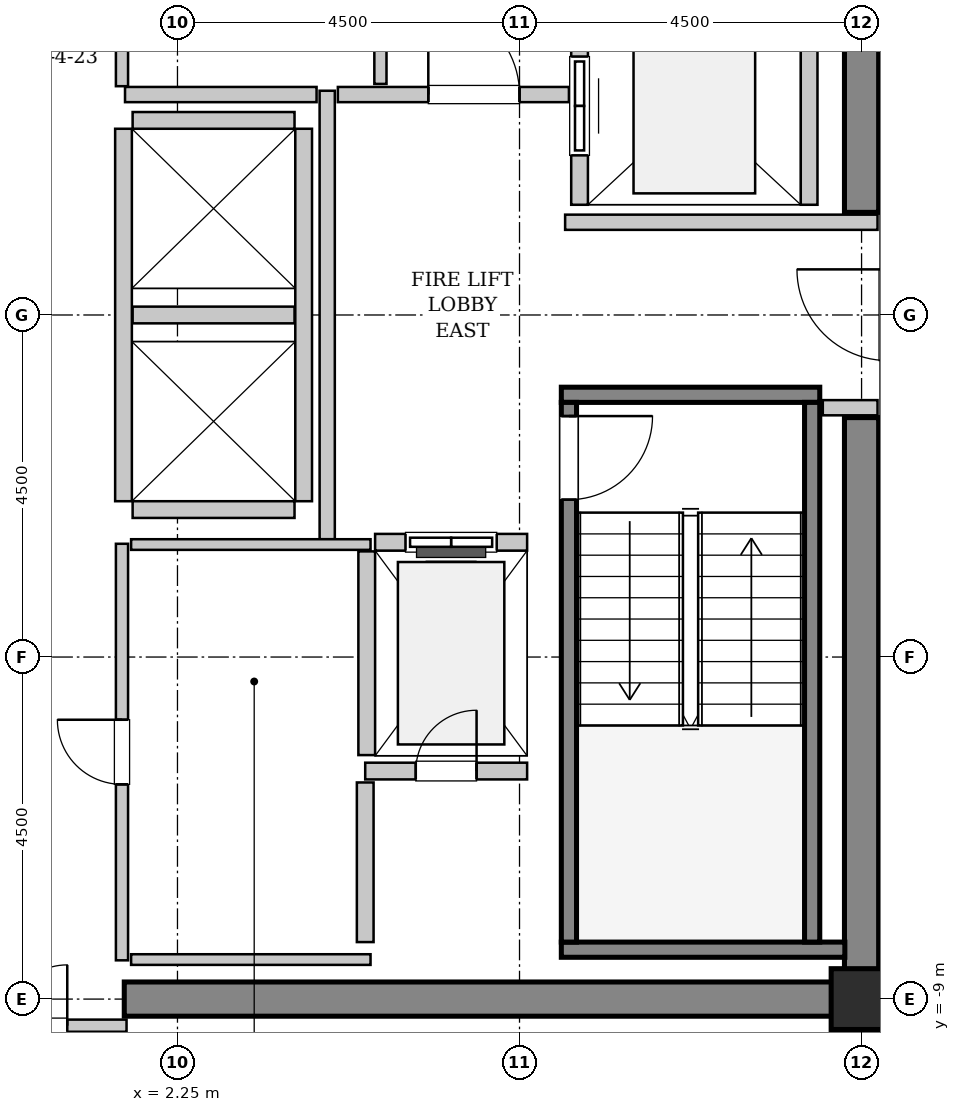
"""IFC4 building model, lengths in metres.
Left out: names, types, materials, properties, quantities, classifications, styles, units other than length and angle.
Written with IfcOpenShell. Run it as: python <this file> out.ifc"""

import sys

from ifc_helpers import new_model, si_unit, direction, frame, frame_2d, origin, origin_2d, place, context, subcontext, project, spatial, rectangle, hollow_rectangle, extrude, source, transform, mapped, element, fill, save


model = new_model("IFC4")
c1 = context("Model", 3, precision=1e-05, world=origin(), true_north=direction((0.0, 1.0)))
c2 = subcontext(c1, "Body", "Model", "MODEL_VIEW")
j1 = project(units=[si_unit("LENGTHUNIT", "METRE"), si_unit("PLANEANGLEUNIT", "RADIAN")], contexts=[c1])
p1 = place(None, origin())
s1 = spatial("IfcSite", under=j1, at=p1, CompositionType="ELEMENT")
p2 = place(p1, origin())
s2 = spatial("IfcBuilding", under=s1, at=p2, CompositionType="ELEMENT")
p3 = place(p2, frame((0.0, 0.0, 287.4)))
s3 = spatial("IfcBuildingStorey", under=s2, at=p3, CompositionType="ELEMENT", Elevation=287.4)
m1 = source(origin(), c2, "Body", "SweptSolid", [
    extrude(rectangle(XDim=9.925, YDim=0.45, at=frame_2d((4.962, 0.0))), origin(), (0.0, 0.0, 1.0), 3.8),
])
p4 = place(p3, frame((1.55, -9.0, 0.0), z_axis=(0.0, 0.0, 1.0), x_axis=(1.0, 0.0, 0.0)))
e1 = element("IfcWall", 1, at=p4, inside=s3, PredefinedType="SHEAR", context=c2, shape_type="MappedRepresentation", body=[
    mapped(m1, transform((0.0, 0.0, 0.0), x_axis=(1.0, 0.0, 0.0), y_axis=(0.0, 1.0, 0.0), z_axis=(0.0, 0.0, 1.0), scale=1.0)),
])
m2 = source(origin(), c2, "Body", "SweptSolid", [
    extrude(rectangle(XDim=7.425, YDim=0.45, at=frame_2d((3.712, 0.0))), origin(), (0.0, 0.0, 1.0), 3.8),
])
for number, where, z_axis, x_axis in (
    (2, (11.25, -8.775, 0.0), (0.0, 0.0, 1.0), (0.0, 1.0, 0.0)),
    (3, (11.25, 1.35, 0.0), (0.0, 0.0, 1.0), (0.0, 1.0, 0.0)),
):
    element("IfcWall", number, at=place(p3, frame(where, z_axis=z_axis, x_axis=x_axis)), inside=s3, PredefinedType="SHEAR", context=c2, shape_type="MappedRepresentation", body=[
        mapped(m2, transform((0.0, 0.0, 0.0), x_axis=(1.0, 0.0, 0.0), y_axis=(0.0, 1.0, 0.0), z_axis=(0.0, 0.0, 1.0), scale=1.0)),
    ])
m3 = source(origin(), c2, "Body", "SweptSolid", [
    extrude(hollow_rectangle(XDim=0.8, YDim=0.8, WallThickness=0.04, InnerFilletRadius=0.04, OuterFilletRadius=0.08, at=origin_2d()), origin(), (0.0, 0.0, 1.0), 3.8),
])
p5 = place(p3, frame((11.25, -9.0, 0.0), z_axis=(0.0, 0.0, 1.0), x_axis=(1.0, 0.0, 0.0)))
e4 = element("IfcColumn", 4, at=p5, inside=s3, PredefinedType="COLUMN", context=c2, shape_type="MappedRepresentation", body=[
    mapped(m3, transform((0.0, 0.0, 0.0), x_axis=(1.0, 0.0, 0.0), y_axis=(0.0, 1.0, 0.0), z_axis=(0.0, 0.0, 1.0), scale=1.0)),
])
m4 = source(origin(), c2, "Body", "SweptSolid", [
    extrude(rectangle(XDim=3.4, YDim=0.2, at=frame_2d((1.7, 0.0))), origin(), (0.0, 0.0, 1.0), 3.8),
])
p6 = place(p3, frame((7.3, -1.05, 0.0), z_axis=(0.0, 0.0, 1.0), x_axis=(1.0, 0.0, 0.0)))
e5 = element("IfcWall", 5, at=p6, inside=s3, PredefinedType="SOLIDWALL", context=c2, shape_type="MappedRepresentation", body=[
    mapped(m4, transform((0.0, 0.0, 0.0), x_axis=(1.0, 0.0, 0.0), y_axis=(0.0, 1.0, 0.0), z_axis=(0.0, 0.0, 1.0), scale=1.0)),
])
m5 = source(origin(), c2, "Body", "SweptSolid", [
    extrude(rectangle(XDim=3.73, YDim=0.2, at=frame_2d((1.865, 0.0))), origin(), (0.0, 0.0, 1.0), 3.8),
])
p7 = place(p3, frame((7.3, -8.35, 0.0), z_axis=(0.0, 0.0, 1.0), x_axis=(1.0, 0.0, 0.0)))
e6 = element("IfcWall", 6, at=p7, inside=s3, PredefinedType="SOLIDWALL", context=c2, shape_type="MappedRepresentation", body=[
    mapped(m5, transform((0.0, 0.0, 0.0), x_axis=(1.0, 0.0, 0.0), y_axis=(0.0, 1.0, 0.0), z_axis=(0.0, 0.0, 1.0), scale=1.0)),
])
m6 = source(origin(), c2, "Body", "SweptSolid", [
    extrude(rectangle(XDim=7.1, YDim=0.2, at=frame_2d((3.55, 0.0))), origin(), (0.0, 0.0, 1.0), 3.8),
])
p8 = place(p3, frame((7.4, -1.15, 0.0), z_axis=(0.0, 0.0, 1.0), x_axis=(0.0, -1.0, 0.0)))
e7 = element("IfcWall", 7, at=p8, inside=s3, PredefinedType="SOLIDWALL", context=c2, shape_type="MappedRepresentation", body=[
    mapped(m6, transform((0.0, 0.0, 0.0), x_axis=(1.0, 0.0, 0.0), y_axis=(0.0, 1.0, 0.0), z_axis=(0.0, 0.0, 1.0), scale=1.0)),
])
p9 = place(p8, frame((0.18, 0.0, 0.0)))
e8 = element("IfcOpeningElement", 8, at=p9, cuts=e7, PredefinedType="OPENING", context=c2, shape_type="SweptSolid", body=[
    extrude(rectangle(XDim=1.1, YDim=2.15, at=frame_2d((0.55, 1.075))), frame((0.0, 0.11, 0.0), z_axis=(0.0, -1.0, 0.0), x_axis=(1.0, 0.0, 0.0)), (0.0, 0.0, 1.0), 0.22),
])
p10 = place(p3, frame((10.6, -1.15, 0.0), z_axis=(0.0, 0.0, 1.0), x_axis=(0.0, -1.0, 0.0)))
e9 = element("IfcWall", 9, at=p10, inside=s3, PredefinedType="SOLIDWALL", context=c2, shape_type="MappedRepresentation", body=[
    mapped(m6, transform((0.0, 0.0, 0.0), x_axis=(1.0, 0.0, 0.0), y_axis=(0.0, 1.0, 0.0), z_axis=(0.0, 0.0, 1.0), scale=1.0)),
])
m7 = source(origin(), c2, "Body", "SweptSolid", [
    extrude(rectangle(XDim=2.0, YDim=0.22, at=frame_2d((1.0, 0.0))), origin(), (0.0, 0.0, 1.0), 3.535),
])
p11 = place(p3, frame((6.85, -2.99, 0.0), z_axis=(0.0, 0.0, 1.0), x_axis=(-1.0, 0.0, 0.0)))
e10 = element("IfcWall", 10, at=p11, inside=s3, PredefinedType="SOLIDWALL", context=c2, shape_type="MappedRepresentation", body=[
    mapped(m7, transform((0.0, 0.0, 0.0), x_axis=(1.0, 0.0, 0.0), y_axis=(0.0, 1.0, 0.0), z_axis=(0.0, 0.0, 1.0), scale=1.0)),
])
p12 = place(p11, frame((0.4, 0.0, 0.0)))
e11 = element("IfcOpeningElement", 11, at=p12, cuts=e10, PredefinedType="OPENING", context=c2, shape_type="SweptSolid", body=[
    extrude(rectangle(XDim=1.2, YDim=2.2, at=frame_2d((0.6, 1.1))), frame((0.0, 0.12, 0.0), z_axis=(0.0, -1.0, 0.0), x_axis=(1.0, 0.0, 0.0)), (0.0, 0.0, 1.0), 0.24),
])
m8 = source(origin(), c2, "Body", "SweptSolid", [
    extrude(rectangle(XDim=2.68, YDim=0.22, at=frame_2d((1.34, 0.0))), origin(), (0.0, 0.0, 1.0), 3.535),
])
p13 = place(p3, frame((4.74, -3.11, 0.0), z_axis=(0.0, 0.0, 1.0), x_axis=(0.0, -1.0, 0.0)))
e12 = element("IfcWall", 12, at=p13, inside=s3, PredefinedType="SOLIDWALL", context=c2, shape_type="MappedRepresentation", body=[
    mapped(m8, transform((0.0, 0.0, 0.0), x_axis=(1.0, 0.0, 0.0), y_axis=(0.0, 1.0, 0.0), z_axis=(0.0, 0.0, 1.0), scale=1.0)),
])
m9 = source(origin(), c2, "Body", "SweptSolid", [
    extrude(rectangle(XDim=5.45, YDim=0.22, at=frame_2d((2.725, 0.0))), origin(), (0.0, 0.0, 1.0), 3.535),
])
p14 = place(p3, frame((7.54, 6.9, 0.0), z_axis=(0.0, 0.0, 1.0), x_axis=(0.0, -1.0, 0.0)))
e13 = element("IfcWall", 13, at=p14, inside=s3, PredefinedType="SOLIDWALL", context=c2, shape_type="MappedRepresentation", body=[
    mapped(m9, transform((0.0, 0.0, 0.0), x_axis=(1.0, 0.0, 0.0), y_axis=(0.0, 1.0, 0.0), z_axis=(0.0, 0.0, 1.0), scale=1.0)),
])
p15 = place(p14, frame((3.5, 0.0, 0.0)))
e14 = element("IfcOpeningElement", 14, at=p15, cuts=e13, PredefinedType="OPENING", context=c2, shape_type="SweptSolid", body=[
    extrude(rectangle(XDim=1.3, YDim=2.3, at=frame_2d((0.65, 1.15))), frame((0.0, 0.12, 0.0), z_axis=(0.0, -1.0, 0.0), x_axis=(1.0, 0.0, 0.0)), (0.0, 0.0, 1.0), 0.24),
])
p16 = place(p14, frame((0.65, 0.0, 0.0)))
e15 = element("IfcOpeningElement", 15, at=p16, cuts=e13, PredefinedType="OPENING", context=c2, shape_type="SweptSolid", body=[
    extrude(rectangle(XDim=1.3, YDim=2.3, at=frame_2d((0.65, 1.15))), frame((0.0, 0.12, 0.0), z_axis=(0.0, -1.0, 0.0), x_axis=(1.0, 0.0, 0.0)), (0.0, 0.0, 1.0), 0.24),
])
p17 = place(p3, frame((10.56, 1.45, 0.0), z_axis=(0.0, 0.0, 1.0), x_axis=(0.0, 1.0, 0.0)))
e16 = element("IfcWall", 16, at=p17, inside=s3, PredefinedType="SOLIDWALL", context=c2, shape_type="MappedRepresentation", body=[
    mapped(m9, transform((0.0, 0.0, 0.0), x_axis=(1.0, 0.0, 0.0), y_axis=(0.0, 1.0, 0.0), z_axis=(0.0, 0.0, 1.0), scale=1.0)),
])
m10 = source(origin(), c2, "Body", "SweptSolid", [
    extrude(rectangle(XDim=4.9, YDim=0.22, at=frame_2d((2.45, 0.0))), origin(), (0.0, 0.0, 1.0), 3.535),
])
for number, where, z_axis, x_axis in (
    (17, (1.54, 2.45, 0.0), (0.0, 0.0, 1.0), (0.0, -1.0, 0.0)),
    (18, (3.91, -2.45, 0.0), (0.0, 0.0, 1.0), (0.0, 1.0, 0.0)),
):
    element("IfcWall", number, at=place(p3, frame(where, z_axis=z_axis, x_axis=x_axis)), inside=s3, PredefinedType="SOLIDWALL", context=c2, shape_type="MappedRepresentation", body=[
        mapped(m10, transform((0.0, 0.0, 0.0), x_axis=(1.0, 0.0, 0.0), y_axis=(0.0, 1.0, 0.0), z_axis=(0.0, 0.0, 1.0), scale=1.0)),
    ])
m11 = source(origin(), c2, "Body", "SweptSolid", [
    extrude(rectangle(XDim=2.13, YDim=0.22, at=frame_2d((1.065, 0.0))), origin(), (0.0, 0.0, 1.0), 3.535),
])
for number, where, z_axis, x_axis in (
    (19, (1.66, -2.56, 0.0), (0.0, 0.0, 1.0), (1.0, 0.0, 0.0)),
    (20, (1.66, 0.0, 0.0), (0.0, 0.0, 1.0), (1.0, 0.0, 0.0)),
    (21, (3.79, 2.56, 0.0), (0.0, 0.0, 1.0), (-1.0, 0.0, 0.0)),
):
    element("IfcWall", number, at=place(p3, frame(where, z_axis=z_axis, x_axis=x_axis)), inside=s3, PredefinedType="SOLIDWALL", context=c2, shape_type="MappedRepresentation", body=[
        mapped(m11, transform((0.0, 0.0, 0.0), x_axis=(1.0, 0.0, 0.0), y_axis=(0.0, 1.0, 0.0), z_axis=(0.0, 0.0, 1.0), scale=1.0)),
    ])
p18 = place(p3, frame((4.72, -6.0, 0.0), z_axis=(0.0, 0.0, 1.0), x_axis=(1.0, 0.0, 0.0)))
e22 = element("IfcWall", 22, at=p18, inside=s3, PredefinedType="SOLIDWALL", context=c2, shape_type="MappedRepresentation", body=[
    mapped(m11, transform((0.0, 0.0, 0.0), x_axis=(1.0, 0.0, 0.0), y_axis=(0.0, 1.0, 0.0), z_axis=(0.0, 0.0, 1.0), scale=1.0)),
])
p19 = place(p18, frame((0.665, 0.0, 0.0)))
e23 = element("IfcOpeningElement", 23, at=p19, cuts=e22, PredefinedType="OPENING", context=c2, shape_type="SweptSolid", body=[
    extrude(rectangle(XDim=0.8, YDim=2.0, at=frame_2d((0.4, 1.0))), frame((0.0, 0.12, 0.0), z_axis=(0.0, -1.0, 0.0), x_axis=(1.0, 0.0, 0.0)), (0.0, 0.0, 1.0), 0.24),
])
m12 = source(origin(), c2, "Body", "SweptSolid", [
    extrude(rectangle(XDim=2.1, YDim=0.22, at=frame_2d((1.05, 0.0))), origin(), (0.0, 0.0, 1.0), 3.535),
])
p20 = place(p3, frame((4.72, -8.25, 0.0), z_axis=(0.0, 0.0, 1.0), x_axis=(0.0, 1.0, 0.0)))
e24 = element("IfcWall", 24, at=p20, inside=s3, PredefinedType="SOLIDWALL", context=c2, shape_type="MappedRepresentation", body=[
    mapped(m12, transform((0.0, 0.0, 0.0), x_axis=(1.0, 0.0, 0.0), y_axis=(0.0, 1.0, 0.0), z_axis=(0.0, 0.0, 1.0), scale=1.0)),
])
m13 = source(origin(), c2, "Body", "SweptSolid", [
    extrude(rectangle(XDim=5.9, YDim=0.2, at=frame_2d((2.95, 0.0))), origin(), (0.0, 0.0, 1.0), 3.535),
])
p21 = place(p3, frame((4.22, -2.95, 0.0), z_axis=(0.0, 0.0, 1.0), x_axis=(0.0, 1.0, 0.0)))
e25 = element("IfcWall", 25, at=p21, inside=s3, PredefinedType="PARTITIONING", context=c2, shape_type="MappedRepresentation", body=[
    mapped(m13, transform((0.0, 0.0, 0.0), x_axis=(1.0, 0.0, 0.0), y_axis=(0.0, 1.0, 0.0), z_axis=(0.0, 0.0, 1.0), scale=1.0)),
])
m14 = source(origin(), c2, "Body", "SweptSolid", [
    extrude(rectangle(XDim=2.52, YDim=0.2, at=frame_2d((1.26, 0.0))), origin(), (0.0, 0.0, 1.0), 3.535),
])
p22 = place(p3, frame((1.56, 2.9, 0.0), z_axis=(0.0, 0.0, 1.0), x_axis=(1.0, 0.0, 0.0)))
e26 = element("IfcWall", 26, at=p22, inside=s3, PredefinedType="PARTITIONING", context=c2, shape_type="MappedRepresentation", body=[
    mapped(m14, transform((0.0, 0.0, 0.0), x_axis=(1.0, 0.0, 0.0), y_axis=(0.0, 1.0, 0.0), z_axis=(0.0, 0.0, 1.0), scale=1.0)),
])
m15 = source(origin(), c2, "Body", "SweptSolid", [
    extrude(rectangle(XDim=3.04, YDim=0.2, at=frame_2d((1.52, 0.0))), origin(), (0.0, 0.0, 1.0), 3.535),
])
p23 = place(p3, frame((4.36, 2.9, 0.0), z_axis=(0.0, 0.0, 1.0), x_axis=(1.0, 0.0, 0.0)))
e27 = element("IfcWall", 27, at=p23, inside=s3, PredefinedType="PARTITIONING", context=c2, shape_type="MappedRepresentation", body=[
    mapped(m15, transform((0.0, 0.0, 0.0), x_axis=(1.0, 0.0, 0.0), y_axis=(0.0, 1.0, 0.0), z_axis=(0.0, 0.0, 1.0), scale=1.0)),
])
p24 = place(p23, frame((1.19, 0.0, 0.0)))
e28 = element("IfcOpeningElement", 28, at=p24, cuts=e27, PredefinedType="OPENING", context=c2, shape_type="SweptSolid", body=[
    extrude(rectangle(XDim=1.2, YDim=2.15, at=frame_2d((0.6, 1.075))), frame((0.0, 0.11, 0.0), z_axis=(0.0, -1.0, 0.0), x_axis=(1.0, 0.0, 0.0)), (0.0, 0.0, 1.0), 0.22),
])
m16 = source(origin(), c2, "Body", "SweptSolid", [
    extrude(rectangle(XDim=4.11, YDim=0.2, at=frame_2d((2.055, 0.0))), origin(), (0.0, 0.0, 1.0), 3.535),
])
p25 = place(p3, frame((7.35, 1.22, 0.0), z_axis=(0.0, 0.0, 1.0), x_axis=(1.0, 0.0, 0.0)))
e29 = element("IfcWall", 29, at=p25, inside=s3, PredefinedType="PARTITIONING", context=c2, shape_type="MappedRepresentation", body=[
    mapped(m16, transform((0.0, 0.0, 0.0), x_axis=(1.0, 0.0, 0.0), y_axis=(0.0, 1.0, 0.0), z_axis=(0.0, 0.0, 1.0), scale=1.0)),
])
m17 = source(origin(), c2, "Body", "SweptSolid", [
    extrude(rectangle(XDim=0.72, YDim=0.2, at=frame_2d((0.36, 0.0))), origin(), (0.0, 0.0, 1.0), 3.535),
])
p26 = place(p3, frame((10.74, -1.22, 0.0), z_axis=(0.0, 0.0, 1.0), x_axis=(1.0, 0.0, 0.0)))
e30 = element("IfcWall", 30, at=p26, inside=s3, PredefinedType="PARTITIONING", context=c2, shape_type="MappedRepresentation", body=[
    mapped(m17, transform((0.0, 0.0, 0.0), x_axis=(1.0, 0.0, 0.0), y_axis=(0.0, 1.0, 0.0), z_axis=(0.0, 0.0, 1.0), scale=1.0)),
])
m18 = source(origin(), c2, "Body", "SweptSolid", [
    extrude(rectangle(XDim=3.16, YDim=0.16, at=frame_2d((1.58, 0.0))), origin(), (0.0, 0.0, 1.0), 2.625),
])
p27 = place(p3, frame((-1.58, -9.35, 0.0), z_axis=(0.0, 0.0, 1.0), x_axis=(1.0, 0.0, 0.0)))
e31 = element("IfcWall", 31, at=p27, inside=s3, PredefinedType="PARTITIONING", context=c2, shape_type="MappedRepresentation", body=[
    mapped(m18, transform((0.0, 0.0, 0.0), x_axis=(1.0, 0.0, 0.0), y_axis=(0.0, 1.0, 0.0), z_axis=(0.0, 0.0, 1.0), scale=1.0)),
])
p28 = place(p27, frame((0.78, 0.0, 0.0)))
e32 = element("IfcOpeningElement", 32, at=p28, cuts=e31, PredefinedType="OPENING", context=c2, shape_type="SweptSolid", body=[
    extrude(rectangle(XDim=1.6, YDim=2.3, at=frame_2d((0.8, 1.15))), frame((0.0, 0.09, 0.0), z_axis=(0.0, -1.0, 0.0), x_axis=(1.0, 0.0, 0.0)), (0.0, 0.0, 1.0), 0.18),
])
m19 = source(origin(), c2, "Body", "SweptSolid", [
    extrude(rectangle(XDim=5.45, YDim=0.16, at=frame_2d((2.725, 0.0))), origin(), (0.0, 0.0, 1.0), 3.535),
])
p29 = place(p3, frame((4.92, 3.04, 0.0), z_axis=(0.0, 0.0, 1.0), x_axis=(0.0, 1.0, 0.0)))
e33 = element("IfcWall", 33, at=p29, inside=s3, PredefinedType="PARTITIONING", context=c2, shape_type="MappedRepresentation", body=[
    mapped(m19, transform((0.0, 0.0, 0.0), x_axis=(1.0, 0.0, 0.0), y_axis=(0.0, 1.0, 0.0), z_axis=(0.0, 0.0, 1.0), scale=1.0)),
])
m20 = source(origin(), c2, "Body", "SweptSolid", [
    extrude(rectangle(XDim=5.48, YDim=0.16, at=frame_2d((2.74, 0.0))), origin(), (0.0, 0.0, 1.0), 3.535),
])
p30 = place(p3, frame((1.52, 3.01, 0.0), z_axis=(0.0, 0.0, 1.0), x_axis=(0.0, 1.0, 0.0)))
e34 = element("IfcWall", 34, at=p30, inside=s3, PredefinedType="PARTITIONING", context=c2, shape_type="MappedRepresentation", body=[
    mapped(m20, transform((0.0, 0.0, 0.0), x_axis=(1.0, 0.0, 0.0), y_axis=(0.0, 1.0, 0.0), z_axis=(0.0, 0.0, 1.0), scale=1.0)),
])
p31 = place(p30, frame((2.315, 0.0, 0.0)))
e35 = element("IfcOpeningElement", 35, at=p31, cuts=e34, PredefinedType="OPENING", context=c2, shape_type="SweptSolid", body=[
    extrude(rectangle(XDim=0.85, YDim=2.1, at=frame_2d((0.425, 1.05))), frame((0.0, 0.09, 0.0), z_axis=(0.0, -1.0, 0.0), x_axis=(1.0, 0.0, 0.0)), (0.0, 0.0, 1.0), 0.18),
])
p32 = place(p3, frame((1.52, -8.49, 0.0), z_axis=(0.0, 0.0, 1.0), x_axis=(0.0, 1.0, 0.0)))
e36 = element("IfcWall", 36, at=p32, inside=s3, PredefinedType="PARTITIONING", context=c2, shape_type="MappedRepresentation", body=[
    mapped(m20, transform((0.0, 0.0, 0.0), x_axis=(1.0, 0.0, 0.0), y_axis=(0.0, 1.0, 0.0), z_axis=(0.0, 0.0, 1.0), scale=1.0)),
])
p33 = place(p32, frame((2.315, 0.0, 0.0)))
e37 = element("IfcOpeningElement", 37, at=p33, cuts=e36, PredefinedType="OPENING", context=c2, shape_type="SweptSolid", body=[
    extrude(rectangle(XDim=0.85, YDim=2.1, at=frame_2d((0.425, 1.05))), frame((0.0, 0.09, 0.0), z_axis=(0.0, -1.0, 0.0), x_axis=(1.0, 0.0, 0.0)), (0.0, 0.0, 1.0), 0.18),
])
m21 = source(origin(), c2, "Body", "SweptSolid", [
    extrude(rectangle(XDim=3.15, YDim=0.14, at=frame_2d((1.575, 0.0))), origin(), (0.0, 0.0, 1.0), 3.535),
])
for number, where, z_axis, x_axis in (
    (38, (1.64, -3.02, 0.0), (0.0, 0.0, 1.0), (1.0, 0.0, 0.0)),
    (39, (1.64, -8.48, 0.0), (0.0, 0.0, 1.0), (1.0, 0.0, 0.0)),
):
    element("IfcWall", number, at=place(p3, frame(where, z_axis=z_axis, x_axis=x_axis)), inside=s3, PredefinedType="PARTITIONING", context=c2, shape_type="MappedRepresentation", body=[
        mapped(m21, transform((0.0, 0.0, 0.0), x_axis=(1.0, 0.0, 0.0), y_axis=(0.0, 1.0, 0.0), z_axis=(0.0, 0.0, 1.0), scale=1.0)),
    ])
m22 = source(origin(), c2, "Body", "SweptSolid", [
    extrude(rectangle(XDim=1.1, YDim=2.15, at=frame_2d((0.55, 1.075))), frame((0.0, 0.025, 0.0), z_axis=(0.0, -1.0, 0.0), x_axis=(1.0, 0.0, 0.0)), (0.0, 0.0, 1.0), 0.05),
])
p34 = place(p9, origin())
e40 = element("IfcDoor", 40, at=p34, inside=s3, OperationType="SINGLE_SWING_LEFT", PredefinedType="DOOR", context=c2, shape_type="MappedRepresentation", body=[
    mapped(m22, transform((0.0, 0.0, 0.0), x_axis=(1.0, 0.0, 0.0), y_axis=(0.0, 1.0, 0.0), z_axis=(0.0, 0.0, 1.0), scale=1.0)),
])
fill(e8, e40)
m23 = source(origin(), c2, "Body", "SweptSolid", [
    extrude(rectangle(XDim=1.2, YDim=2.2, at=frame_2d((0.6, 1.1))), frame((0.0, 0.025, 0.0), z_axis=(0.0, -1.0, 0.0), x_axis=(1.0, 0.0, 0.0)), (0.0, 0.0, 1.0), 0.05),
])
p35 = place(p12, origin())
e41 = element("IfcDoor", 41, at=p35, inside=s3, OperationType="SLIDING_TO_LEFT", PredefinedType="DOOR", context=c2, shape_type="MappedRepresentation", body=[
    mapped(m23, transform((0.0, 0.0, 0.0), x_axis=(1.0, 0.0, 0.0), y_axis=(0.0, 1.0, 0.0), z_axis=(0.0, 0.0, 1.0), scale=1.0)),
])
fill(e11, e41)
m24 = source(origin(), c2, "Body", "SweptSolid", [
    extrude(rectangle(XDim=1.3, YDim=2.3, at=frame_2d((0.65, 1.15))), frame((0.0, 0.025, 0.0), z_axis=(0.0, -1.0, 0.0), x_axis=(1.0, 0.0, 0.0)), (0.0, 0.0, 1.0), 0.05),
])
p36 = place(p15, origin())
e42 = element("IfcDoor", 42, at=p36, inside=s3, OperationType="SLIDING_TO_RIGHT", PredefinedType="DOOR", context=c2, shape_type="MappedRepresentation", body=[
    mapped(m24, transform((0.0, 0.0, 0.0), x_axis=(1.0, 0.0, 0.0), y_axis=(0.0, 1.0, 0.0), z_axis=(0.0, 0.0, 1.0), scale=1.0)),
])
fill(e14, e42)
m25 = source(origin(), c2, "Body", "SweptSolid", [
    extrude(rectangle(XDim=0.8, YDim=2.0, at=frame_2d((0.4, 1.0))), frame((0.0, 0.025, 0.0), z_axis=(0.0, -1.0, 0.0), x_axis=(1.0, 0.0, 0.0)), (0.0, 0.0, 1.0), 0.05),
])
p37 = place(p19, origin())
e43 = element("IfcDoor", 43, at=p37, inside=s3, OperationType="SINGLE_SWING_RIGHT", PredefinedType="TRAPDOOR", context=c2, shape_type="MappedRepresentation", body=[
    mapped(m25, transform((0.0, 0.0, 0.0), x_axis=(1.0, 0.0, 0.0), y_axis=(0.0, 1.0, 0.0), z_axis=(0.0, 0.0, 1.0), scale=1.0)),
])
fill(e23, e43)
m26 = source(origin(), c2, "Body", "SweptSolid", [
    extrude(rectangle(XDim=1.2, YDim=2.15, at=frame_2d((0.6, 1.075))), frame((0.0, 0.025, 0.0), z_axis=(0.0, -1.0, 0.0), x_axis=(1.0, 0.0, 0.0)), (0.0, 0.0, 1.0), 0.05),
])
p38 = place(p24, origin())
e44 = element("IfcDoor", 44, at=p38, inside=s3, OperationType="SINGLE_SWING_LEFT", PredefinedType="DOOR", context=c2, shape_type="MappedRepresentation", body=[
    mapped(m26, transform((0.0, 0.0, 0.0), x_axis=(1.0, 0.0, 0.0), y_axis=(0.0, 1.0, 0.0), z_axis=(0.0, 0.0, 1.0), scale=1.0)),
])
fill(e28, e44)
m27 = source(origin(), c2, "Body", "SweptSolid", [
    extrude(rectangle(XDim=1.6, YDim=2.3, at=frame_2d((0.8, 1.15))), frame((0.0, 0.025, 0.0), z_axis=(0.0, -1.0, 0.0), x_axis=(1.0, 0.0, 0.0)), (0.0, 0.0, 1.0), 0.05),
])
p39 = place(p28, origin())
e45 = element("IfcDoor", 45, at=p39, inside=s3, OperationType="DOUBLE_DOOR_SINGLE_SWING", PredefinedType="DOOR", context=c2, shape_type="MappedRepresentation", body=[
    mapped(m27, transform((0.0, 0.0, 0.0), x_axis=(1.0, 0.0, 0.0), y_axis=(0.0, 1.0, 0.0), z_axis=(0.0, 0.0, 1.0), scale=1.0)),
])
fill(e32, e45)
m28 = source(origin(), c2, "Body", "SweptSolid", [
    extrude(rectangle(XDim=0.85, YDim=2.1, at=frame_2d((0.425, 1.05))), frame((0.0, 0.025, 0.0), z_axis=(0.0, -1.0, 0.0), x_axis=(1.0, 0.0, 0.0)), (0.0, 0.0, 1.0), 0.05),
])
p40 = place(p33, origin())
e46 = element("IfcDoor", 46, at=p40, inside=s3, OperationType="SINGLE_SWING_RIGHT", PredefinedType="DOOR", context=c2, shape_type="MappedRepresentation", body=[
    mapped(m28, transform((0.0, 0.0, 0.0), x_axis=(1.0, 0.0, 0.0), y_axis=(0.0, 1.0, 0.0), z_axis=(0.0, 0.0, 1.0), scale=1.0)),
])
fill(e37, e46)
save(model, sys.argv[1])
